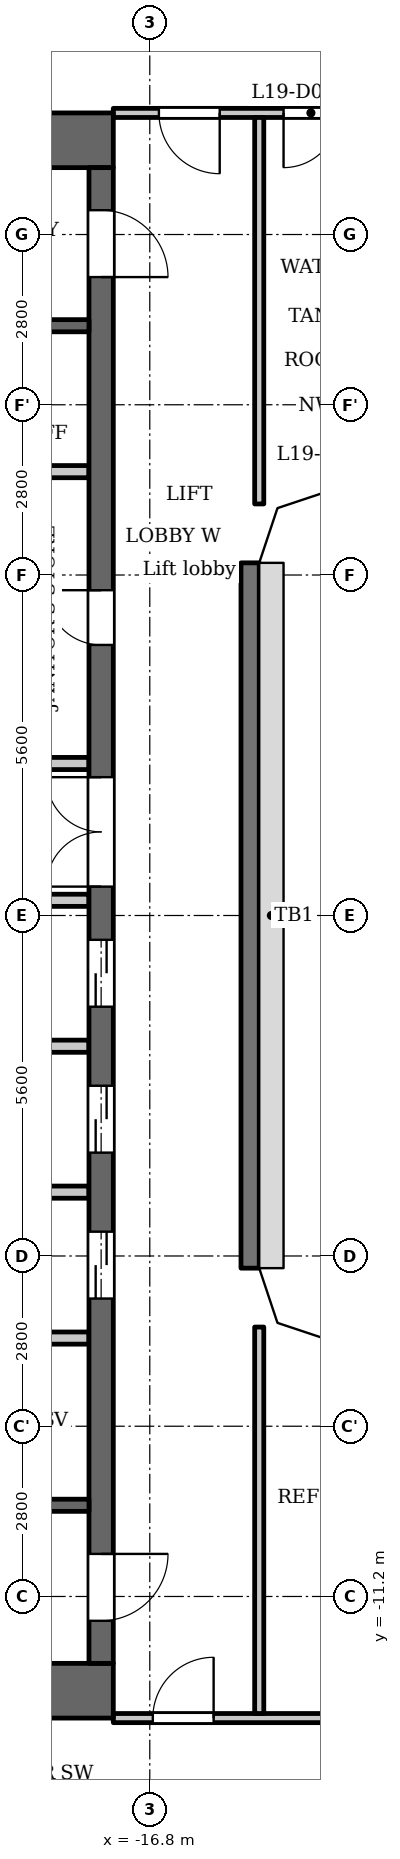
"""IFC4 building model, lengths in metres.
Left out: names, types, materials, properties, quantities, classifications, styles, units other than length and angle.
Written with IfcOpenShell. Run it as: python <this file> out.ifc"""

import sys

from ifc_helpers import new_model, si_unit, direction, frame, frame_2d, origin, place, context, subcontext, project, spatial, polyline, rectangle, outline, extrude, element, fill, save


model = new_model("IFC4")
c1 = context("Model", 3, precision=1e-05, world=origin(), true_north=direction((0.0, 1.0)))
c2 = subcontext(c1, "Body", "Model", "MODEL_VIEW")
j1 = project(units=[si_unit("LENGTHUNIT", "METRE"), si_unit("PLANEANGLEUNIT", "RADIAN")], contexts=[c1])
p1 = place(None, origin())
s1 = spatial("IfcSite", under=j1, at=p1, CompositionType="ELEMENT")
p2 = place(p1, origin())
s2 = spatial("IfcBuilding", under=s1, at=p2, CompositionType="ELEMENT")
p3 = place(p2, frame((0.0, 0.0, 77.9)))
s3 = spatial("IfcBuildingStorey", under=s2, at=p3, CompositionType="ELEMENT", Elevation=77.9)
p4 = place(p3, frame((-15.15, -5.8, 0.0), z_axis=(0.0, 0.0, 1.0), x_axis=(0.0, 1.0, 0.0)))
e1 = element("IfcWall", 1, at=p4, inside=s3, PredefinedType="SOLIDWALL", context=c2, shape_type="SweptSolid", body=[
    extrude(rectangle(XDim=11.6, YDim=0.3, at=frame_2d((5.8, 0.0))), origin(), (0.0, 0.0, 1.0), 5.1),
])
for number, where, z_axis, x_axis in (
    (2, (-17.4, 12.75, 0.0), (0.0, 0.0, 1.0), (-1.0, 0.0, 0.0)),
    (3, (-17.4, -12.75, 0.0), (0.0, 0.0, 1.0), (-1.0, 0.0, 0.0)),
):
    element("IfcWall", number, at=place(p3, frame(where, z_axis=z_axis, x_axis=x_axis)), inside=s3, PredefinedType="SHEAR", context=c2, shape_type="SweptSolid", body=[
        extrude(rectangle(XDim=10.4, YDim=0.9, at=frame_2d((5.2, 0.0))), origin(), (0.0, 0.0, 1.0), 5.1),
    ])
p5 = place(p3, frame((-17.6, -12.3, 0.0), z_axis=(0.0, 0.0, 1.0), x_axis=(0.0, 1.0, 0.0)))
e4 = element("IfcWall", 4, at=p5, inside=s3, PredefinedType="SHEAR", context=c2, shape_type="SweptSolid", body=[
    extrude(rectangle(XDim=24.6, YDim=0.4, at=frame_2d((12.3, 0.0))), origin(), (0.0, 0.0, 1.0), 5.1),
])
p6 = place(p5, frame((6.0, 0.0, 0.0)))
e5 = element("IfcOpeningElement", 5, at=p6, cuts=e4, PredefinedType="OPENING", context=c2, shape_type="SweptSolid", body=[
    extrude(rectangle(XDim=1.1, YDim=2.1, at=frame_2d((0.55, 1.05))), frame((0.0, 0.21, 0.0), z_axis=(0.0, -1.0, 0.0), x_axis=(1.0, 0.0, 0.0)), (0.0, 0.0, 1.0), 0.42),
])
p7 = place(p5, frame((8.4, 0.0, 0.0)))
e6 = element("IfcOpeningElement", 6, at=p7, cuts=e4, PredefinedType="OPENING", context=c2, shape_type="SweptSolid", body=[
    extrude(rectangle(XDim=1.1, YDim=2.1, at=frame_2d((0.55, 1.05))), frame((0.0, 0.21, 0.0), z_axis=(0.0, -1.0, 0.0), x_axis=(1.0, 0.0, 0.0)), (0.0, 0.0, 1.0), 0.42),
])
p8 = place(p5, frame((10.8, 0.0, 0.0)))
e7 = element("IfcOpeningElement", 7, at=p8, cuts=e4, PredefinedType="OPENING", context=c2, shape_type="SweptSolid", body=[
    extrude(rectangle(XDim=1.1, YDim=2.1, at=frame_2d((0.55, 1.05))), frame((0.0, 0.21, 0.0), z_axis=(0.0, -1.0, 0.0), x_axis=(1.0, 0.0, 0.0)), (0.0, 0.0, 1.0), 0.42),
])
p9 = place(p5, frame((16.75, 0.0, 0.0)))
e8 = element("IfcOpeningElement", 8, at=p9, cuts=e4, PredefinedType="OPENING", context=c2, shape_type="SweptSolid", body=[
    extrude(rectangle(XDim=0.9, YDim=2.1, at=frame_2d((0.45, 1.05))), frame((0.0, 0.21, 0.0), z_axis=(0.0, -1.0, 0.0), x_axis=(1.0, 0.0, 0.0)), (0.0, 0.0, 1.0), 0.42),
])
p10 = place(p5, frame((22.8, 0.0, 0.0)))
e9 = element("IfcOpeningElement", 9, at=p10, cuts=e4, PredefinedType="OPENING", context=c2, shape_type="SweptSolid", body=[
    extrude(rectangle(XDim=1.1, YDim=2.1, at=frame_2d((0.55, 1.05))), frame((0.0, 0.21, 0.0), z_axis=(0.0, -1.0, 0.0), x_axis=(1.0, 0.0, 0.0)), (0.0, 0.0, 1.0), 0.42),
])
p11 = place(p5, frame((0.7, 0.0, 0.0)))
e10 = element("IfcOpeningElement", 10, at=p11, cuts=e4, PredefinedType="OPENING", context=c2, shape_type="SweptSolid", body=[
    extrude(rectangle(XDim=1.1, YDim=2.1, at=frame_2d((0.55, 1.05))), frame((0.0, 0.21, 0.0), z_axis=(0.0, -1.0, 0.0), x_axis=(1.0, 0.0, 0.0)), (0.0, 0.0, 1.0), 0.42),
])
p12 = place(p5, frame((12.775, 0.0, 0.0)))
e11 = element("IfcOpeningElement", 11, at=p12, cuts=e4, PredefinedType="OPENING", context=c2, shape_type="SweptSolid", body=[
    extrude(rectangle(XDim=1.8, YDim=2.1, at=frame_2d((0.9, 1.05))), frame((0.0, 0.21, 0.0), z_axis=(0.0, -1.0, 0.0), x_axis=(1.0, 0.0, 0.0)), (0.0, 0.0, 1.0), 0.42),
])
p13 = place(p3, frame((-17.8, -9.7, 0.0), z_axis=(0.0, 0.0, 1.0), x_axis=(-1.0, 0.0, 0.0)))
e12 = element("IfcWall", 12, at=p13, inside=s3, PredefinedType="SHEAR", context=c2, shape_type="SweptSolid", body=[
    extrude(rectangle(XDim=8.3, YDim=0.2, at=frame_2d((4.15, 0.0))), origin(), (0.0, 0.0, 1.0), 5.1),
])
p14 = place(p13, frame((0.85, 0.0, 0.0)))
e13 = element("IfcOpeningElement", 13, at=p14, cuts=e12, PredefinedType="OPENING", context=c2, shape_type="SweptSolid", body=[
    extrude(rectangle(XDim=1.1, YDim=2.1, at=frame_2d((0.55, 1.05))), frame((0.0, 0.11, 0.0), z_axis=(0.0, -1.0, 0.0), x_axis=(1.0, 0.0, 0.0)), (0.0, 0.0, 1.0), 0.22),
])
p15 = place(p13, frame((3.75, 0.0, 0.0)))
e14 = element("IfcOpeningElement", 14, at=p15, cuts=e12, PredefinedType="OPENING", context=c2, shape_type="SweptSolid", body=[
    extrude(rectangle(XDim=1.1, YDim=2.1, at=frame_2d((0.55, 1.05))), frame((0.0, 0.11, 0.0), z_axis=(0.0, -1.0, 0.0), x_axis=(1.0, 0.0, 0.0)), (0.0, 0.0, 1.0), 0.22),
])
for number, where, z_axis, x_axis in (
    (15, (-17.8, -6.95, 0.0), (0.0, 0.0, 1.0), (-1.0, 0.0, 0.0)),
    (16, (-17.8, -4.55, 0.0), (0.0, 0.0, 1.0), (-1.0, 0.0, 0.0)),
    (17, (-17.8, -2.15, 0.0), (0.0, 0.0, 1.0), (-1.0, 0.0, 0.0)),
):
    element("IfcWall", number, at=place(p3, frame(where, z_axis=z_axis, x_axis=x_axis)), inside=s3, PredefinedType="PARTITIONING", context=c2, shape_type="SweptSolid", body=[
        extrude(rectangle(XDim=2.8, YDim=0.2, at=frame_2d((1.4, 0.0))), origin(), (0.0, 0.0, 1.0), 5.1),
    ])
p16 = place(p3, frame((-17.8, 0.25, 0.0), z_axis=(0.0, 0.0, 1.0), x_axis=(-1.0, 0.0, 0.0)))
e18 = element("IfcWall", 18, at=p16, inside=s3, PredefinedType="PARTITIONING", context=c2, shape_type="SweptSolid", body=[
    extrude(rectangle(XDim=3.0, YDim=0.2, at=frame_2d((1.5, 0.0))), origin(), (0.0, 0.0, 1.0), 5.1),
])
p17 = place(p3, frame((-17.8, 2.5, 0.0), z_axis=(0.0, 0.0, 1.0), x_axis=(-1.0, 0.0, 0.0)))
e19 = element("IfcWall", 19, at=p17, inside=s3, PredefinedType="PARTITIONING", context=c2, shape_type="SweptSolid", body=[
    extrude(rectangle(XDim=3.0, YDim=0.2, at=frame_2d((1.5, 0.0))), origin(), (0.0, 0.0, 1.0), 5.1),
])
p18 = place(p17, frame((1.7, 0.0, 0.0)))
e20 = element("IfcOpeningElement", 20, at=p18, cuts=e19, PredefinedType="OPENING", context=c2, shape_type="SweptSolid", body=[
    extrude(rectangle(XDim=0.9, YDim=2.1, at=frame_2d((0.45, 1.05))), frame((0.0, 0.11, 0.0), z_axis=(0.0, -1.0, 0.0), x_axis=(1.0, 0.0, 0.0)), (0.0, 0.0, 1.0), 0.22),
])
p19 = place(p3, frame((-17.8, 7.3, 0.0), z_axis=(0.0, 0.0, 1.0), x_axis=(-1.0, 0.0, 0.0)))
e21 = element("IfcWall", 21, at=p19, inside=s3, PredefinedType="PARTITIONING", context=c2, shape_type="SweptSolid", body=[
    extrude(rectangle(XDim=2.8, YDim=0.2, at=frame_2d((1.4, 0.0))), origin(), (0.0, 0.0, 1.0), 5.1),
])
p20 = place(p3, frame((-17.8, 9.7, 0.0), z_axis=(0.0, 0.0, 1.0), x_axis=(-1.0, 0.0, 0.0)))
e22 = element("IfcWall", 22, at=p20, inside=s3, PredefinedType="SHEAR", context=c2, shape_type="SweptSolid", body=[
    extrude(rectangle(XDim=8.3, YDim=0.2, at=frame_2d((4.15, 0.0))), origin(), (0.0, 0.0, 1.0), 5.1),
])
p21 = place(p20, frame((0.85, 0.0, 0.0)))
e23 = element("IfcOpeningElement", 23, at=p21, cuts=e22, PredefinedType="OPENING", context=c2, shape_type="SweptSolid", body=[
    extrude(rectangle(XDim=1.1, YDim=2.1, at=frame_2d((0.55, 1.05))), frame((0.0, 0.11, 0.0), z_axis=(0.0, -1.0, 0.0), x_axis=(1.0, 0.0, 0.0)), (0.0, 0.0, 1.0), 0.22),
])
p22 = place(p20, frame((3.75, 0.0, 0.0)))
e24 = element("IfcOpeningElement", 24, at=p22, cuts=e22, PredefinedType="OPENING", context=c2, shape_type="SweptSolid", body=[
    extrude(rectangle(XDim=1.1, YDim=2.1, at=frame_2d((0.55, 1.05))), frame((0.0, 0.11, 0.0), z_axis=(0.0, -1.0, 0.0), x_axis=(1.0, 0.0, 0.0)), (0.0, 0.0, 1.0), 0.22),
])
p23 = place(p3, frame((-17.4, -13.2, 0.0), z_axis=(0.0, 0.0, 1.0), x_axis=(1.0, 0.0, 0.0)))
e25 = element("IfcWall", 25, at=p23, inside=s3, PredefinedType="PARTITIONING", context=c2, shape_type="SweptSolid", body=[
    extrude(rectangle(XDim=5.88, YDim=0.15, at=frame_2d((2.94, 0.0))), origin(), (0.0, 0.0, 1.0), 5.1),
])
p24 = place(p23, frame((0.65, 0.0, 0.0)))
e26 = element("IfcOpeningElement", 26, at=p24, cuts=e25, PredefinedType="OPENING", context=c2, shape_type="SweptSolid", body=[
    extrude(rectangle(XDim=1.0, YDim=2.1, at=frame_2d((0.5, 1.05))), frame((0.0, 0.085, 0.0), z_axis=(0.0, -1.0, 0.0), x_axis=(1.0, 0.0, 0.0)), (0.0, 0.0, 1.0), 0.17),
])
p25 = place(p23, frame((4.26, 0.0, 0.0)))
e27 = element("IfcOpeningElement", 27, at=p25, cuts=e25, PredefinedType="OPENING", context=c2, shape_type="SweptSolid", body=[
    extrude(rectangle(XDim=1.2, YDim=2.1, at=frame_2d((0.6, 1.05))), frame((0.0, 0.085, 0.0), z_axis=(0.0, -1.0, 0.0), x_axis=(1.0, 0.0, 0.0)), (0.0, 0.0, 1.0), 0.17),
])
p26 = place(p3, frame((-17.4, 13.2, 0.0), z_axis=(0.0, 0.0, 1.0), x_axis=(1.0, 0.0, 0.0)))
e28 = element("IfcWall", 28, at=p26, inside=s3, PredefinedType="PARTITIONING", context=c2, shape_type="SweptSolid", body=[
    extrude(rectangle(XDim=5.88, YDim=0.15, at=frame_2d((2.94, 0.0))), origin(), (0.0, 0.0, 1.0), 5.1),
])
p27 = place(p26, frame((0.75, 0.0, 0.0)))
e29 = element("IfcOpeningElement", 29, at=p27, cuts=e28, PredefinedType="OPENING", context=c2, shape_type="SweptSolid", body=[
    extrude(rectangle(XDim=1.0, YDim=2.1, at=frame_2d((0.5, 1.05))), frame((0.0, 0.085, 0.0), z_axis=(0.0, -1.0, 0.0), x_axis=(1.0, 0.0, 0.0)), (0.0, 0.0, 1.0), 0.17),
])
p28 = place(p26, frame((4.7, 0.0, 0.0)))
e30 = element("IfcOpeningElement", 30, at=p28, cuts=e28, PredefinedType="OPENING", context=c2, shape_type="SweptSolid", body=[
    extrude(rectangle(XDim=0.9, YDim=2.1, at=frame_2d((0.45, 1.05))), frame((0.0, 0.085, 0.0), z_axis=(0.0, -1.0, 0.0), x_axis=(1.0, 0.0, 0.0)), (0.0, 0.0, 1.0), 0.17),
])
p29 = place(p26, frame((2.8, 0.0, 0.0)))
e31 = element("IfcOpeningElement", 31, at=p29, cuts=e28, PredefinedType="OPENING", context=c2, shape_type="SweptSolid", body=[
    extrude(rectangle(XDim=0.9, YDim=2.1, at=frame_2d((0.45, 1.05))), frame((0.0, 0.085, 0.0), z_axis=(0.0, -1.0, 0.0), x_axis=(1.0, 0.0, 0.0)), (0.0, 0.0, 1.0), 0.17),
])
for number, where, z_axis, x_axis in (
    (32, (-15.0, -13.125, 0.0), (0.0, 0.0, 1.0), (0.0, 1.0, 0.0)),
    (33, (-15.0, 6.769, 0.0), (0.0, 0.0, 1.0), (0.0, 1.0, 0.0)),
):
    element("IfcWall", number, at=place(p3, frame(where, z_axis=z_axis, x_axis=x_axis)), inside=s3, PredefinedType="PARTITIONING", context=c2, shape_type="SweptSolid", body=[
        extrude(rectangle(XDim=6.356, YDim=0.15, at=frame_2d((3.178, 0.0))), origin(), (0.0, 0.0, 1.0), 5.1),
    ])
p30 = place(p3, origin())
e34 = element("IfcWall", 34, at=p30, inside=s3, PredefinedType="SOLIDWALL", context=c2, shape_type="SweptSolid", body=[
    extrude(outline(polyline([(-15.0, 5.8), (-14.7, 6.7), (-13.8, 7.0), (-13.8, 7.3), (-13.849, 7.3), (-14.937, 6.937), (-15.3, 5.849), (-15.3, 5.8), (-15.0, 5.8)])), origin(), (0.0, 0.0, 1.0), 5.1),
])
e35 = element("IfcWall", 35, at=p30, inside=s3, PredefinedType="SOLIDWALL", context=c2, shape_type="SweptSolid", body=[
    extrude(outline(polyline([(-13.8, -7.0), (-14.7, -6.7), (-15.0, -5.8), (-15.3, -5.8), (-15.3, -5.849), (-14.937, -6.937), (-13.849, -7.3), (-13.8, -7.3), (-13.8, -7.0)])), origin(), (0.0, 0.0, 1.0), 5.1),
])
p31 = place(p6, origin())
e36 = element("IfcDoor", 36, at=p31, inside=s3, OperationType="DOUBLE_DOOR_SLIDING", PredefinedType="DOOR", context=c2, shape_type="SweptSolid", body=[
    extrude(rectangle(XDim=1.1, YDim=2.1, at=frame_2d((0.55, 1.05))), frame((0.0, 0.025, 0.0), z_axis=(0.0, -1.0, 0.0), x_axis=(1.0, 0.0, 0.0)), (0.0, 0.0, 1.0), 0.05),
])
fill(e5, e36)
p32 = place(p7, origin())
e37 = element("IfcDoor", 37, at=p32, inside=s3, OperationType="DOUBLE_DOOR_SLIDING", PredefinedType="DOOR", context=c2, shape_type="SweptSolid", body=[
    extrude(rectangle(XDim=1.1, YDim=2.1, at=frame_2d((0.55, 1.05))), frame((0.0, 0.025, 0.0), z_axis=(0.0, -1.0, 0.0), x_axis=(1.0, 0.0, 0.0)), (0.0, 0.0, 1.0), 0.05),
])
fill(e6, e37)
p33 = place(p8, origin())
e38 = element("IfcDoor", 38, at=p33, inside=s3, OperationType="DOUBLE_DOOR_SLIDING", PredefinedType="DOOR", context=c2, shape_type="SweptSolid", body=[
    extrude(rectangle(XDim=1.1, YDim=2.1, at=frame_2d((0.55, 1.05))), frame((0.0, 0.025, 0.0), z_axis=(0.0, -1.0, 0.0), x_axis=(1.0, 0.0, 0.0)), (0.0, 0.0, 1.0), 0.05),
])
fill(e7, e38)
p34 = place(p9, origin())
e39 = element("IfcDoor", 39, at=p34, inside=s3, OperationType="SINGLE_SWING_LEFT", PredefinedType="DOOR", context=c2, shape_type="SweptSolid", body=[
    extrude(rectangle(XDim=0.9, YDim=2.1, at=frame_2d((0.45, 1.05))), frame((0.0, 0.025, 0.0), z_axis=(0.0, -1.0, 0.0), x_axis=(1.0, 0.0, 0.0)), (0.0, 0.0, 1.0), 0.05),
])
fill(e8, e39)
p35 = place(p10, origin())
e40 = element("IfcDoor", 40, at=p35, inside=s3, OperationType="SINGLE_SWING_LEFT", PredefinedType="DOOR", context=c2, shape_type="SweptSolid", body=[
    extrude(rectangle(XDim=1.1, YDim=2.1, at=frame_2d((0.55, 1.05))), frame((0.0, 0.025, 0.0), z_axis=(0.0, -1.0, 0.0), x_axis=(1.0, 0.0, 0.0)), (0.0, 0.0, 1.0), 0.05),
])
fill(e9, e40)
p36 = place(p11, origin())
e41 = element("IfcDoor", 41, at=p36, inside=s3, OperationType="SINGLE_SWING_RIGHT", PredefinedType="DOOR", context=c2, shape_type="SweptSolid", body=[
    extrude(rectangle(XDim=1.1, YDim=2.1, at=frame_2d((0.55, 1.05))), frame((0.0, 0.025, 0.0), z_axis=(0.0, -1.0, 0.0), x_axis=(1.0, 0.0, 0.0)), (0.0, 0.0, 1.0), 0.05),
])
fill(e10, e41)
p37 = place(p12, origin())
e42 = element("IfcDoor", 42, at=p37, inside=s3, OperationType="DOUBLE_DOOR_SINGLE_SWING", PredefinedType="DOOR", context=c2, shape_type="SweptSolid", body=[
    extrude(rectangle(XDim=1.8, YDim=2.1, at=frame_2d((0.9, 1.05))), frame((0.0, 0.025, 0.0), z_axis=(0.0, -1.0, 0.0), x_axis=(1.0, 0.0, 0.0)), (0.0, 0.0, 1.0), 0.05),
])
fill(e11, e42)
p38 = place(p27, origin())
e43 = element("IfcDoor", 43, at=p38, inside=s3, OperationType="SINGLE_SWING_RIGHT", PredefinedType="DOOR", context=c2, shape_type="SweptSolid", body=[
    extrude(rectangle(XDim=1.0, YDim=2.1, at=frame_2d((0.5, 1.05))), frame((0.0, 0.025, 0.0), z_axis=(0.0, -1.0, 0.0), x_axis=(1.0, 0.0, 0.0)), (0.0, 0.0, 1.0), 0.05),
])
fill(e29, e43)
p39 = place(p29, origin())
e44 = element("IfcDoor", 44, at=p39, inside=s3, OperationType="SINGLE_SWING_LEFT", PredefinedType="DOOR", context=c2, shape_type="SweptSolid", body=[
    extrude(rectangle(XDim=0.9, YDim=2.1, at=frame_2d((0.45, 1.05))), frame((0.0, 0.025, 0.0), z_axis=(0.0, -1.0, 0.0), x_axis=(1.0, 0.0, 0.0)), (0.0, 0.0, 1.0), 0.05),
])
fill(e31, e44)
p40 = place(p24, origin())
e45 = element("IfcDoor", 45, at=p40, inside=s3, OperationType="SINGLE_SWING_LEFT", PredefinedType="DOOR", context=c2, shape_type="SweptSolid", body=[
    extrude(rectangle(XDim=1.0, YDim=2.1, at=frame_2d((0.5, 1.05))), frame((0.0, 0.025, 0.0), z_axis=(0.0, -1.0, 0.0), x_axis=(1.0, 0.0, 0.0)), (0.0, 0.0, 1.0), 0.05),
])
fill(e26, e45)
save(model, sys.argv[1])
